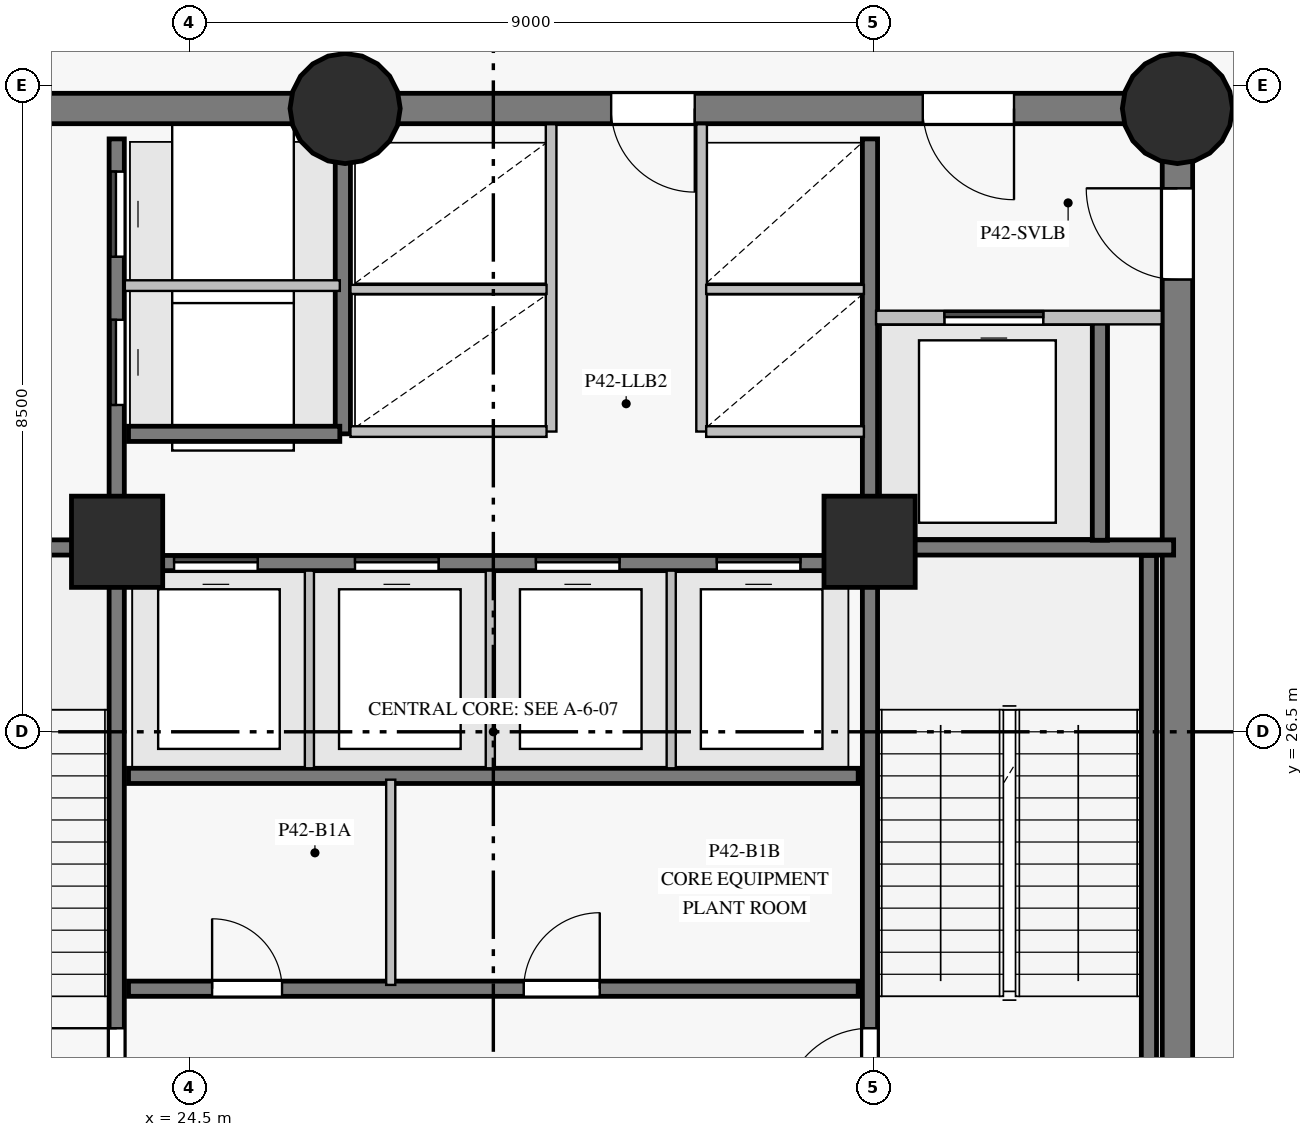
"""IFC4 building model, lengths in metres.
Left out: names, types, materials, properties, quantities, classifications, styles, units other than length and angle.
Written with IfcOpenShell. Run it as: python <this file> out.ifc"""

import sys

from ifc_helpers import new_model, si_unit, direction, frame, frame_2d, origin, origin_with_axes, origin_2d, place, context, subcontext, project, spatial, rectangle, circle, extrude, source, transform, mapped, element, fill, save


model = new_model("IFC4")
c1 = context("Model", 3, precision=1e-05, world=origin(), true_north=direction((0.0, 1.0)))
c2 = subcontext(c1, "Body", "Model", "MODEL_VIEW")
j1 = project(units=[si_unit("LENGTHUNIT", "METRE"), si_unit("PLANEANGLEUNIT", "RADIAN")], contexts=[c1])
p1 = place(None, origin())
s1 = spatial("IfcSite", under=j1, at=p1, CompositionType="ELEMENT")
p2 = place(p1, origin())
s2 = spatial("IfcBuilding", under=s1, at=p2, CompositionType="ELEMENT")
p3 = place(p2, frame((0.0, 0.0, 148.05)))
s3 = spatial("IfcBuildingStorey", under=s2, at=p3, CompositionType="ELEMENT", Elevation=148.05)
p4 = place(p3, frame((37.5, 18.3, 0.0), z_axis=(0.0, 0.0, 1.0), x_axis=(0.0, 1.0, 0.0)))
e1 = element("IfcWall", 1, at=p4, inside=s3, PredefinedType="SHEAR", context=c2, shape_type="SweptSolid", body=[
    extrude(rectangle(XDim=16.4, YDim=0.4, at=frame_2d((8.2, 0.0))), origin(), (0.0, 0.0, 1.0), 4.275),
])
p5 = place(p4, frame((14.15, 0.0, 0.0)))
e2 = element("IfcOpeningElement", 2, at=p5, cuts=e1, PredefinedType="OPENING", context=c2, shape_type="SweptSolid", body=[
    extrude(rectangle(XDim=1.2, YDim=2.15, at=frame_2d((0.6, 1.075))), frame((0.0, 0.21, 0.0), z_axis=(0.0, -1.0, 0.0), x_axis=(1.0, 0.0, 0.0)), (0.0, 0.0, 1.0), 0.42),
])
p6 = place(p3, frame((37.5, 34.7, 0.0), z_axis=(0.0, 0.0, 1.0), x_axis=(-1.0, 0.0, 0.0)))
e3 = element("IfcWall", 3, at=p6, inside=s3, PredefinedType="SHEAR", context=c2, shape_type="SweptSolid", body=[
    extrude(rectangle(XDim=10.95, YDim=0.4, at=frame_2d((5.475, 0.0))), origin(), (0.0, 0.0, 1.0), 4.275),
])
p7 = place(p6, frame((2.15, 0.0, 0.0)))
e4 = element("IfcOpeningElement", 4, at=p7, cuts=e3, PredefinedType="OPENING", context=c2, shape_type="SweptSolid", body=[
    extrude(rectangle(XDim=1.2, YDim=2.15, at=frame_2d((0.6, 1.075))), frame((0.0, 0.21, 0.0), z_axis=(0.0, -1.0, 0.0), x_axis=(1.0, 0.0, 0.0)), (0.0, 0.0, 1.0), 0.42),
])
p8 = place(p6, frame((6.35, 0.0, 0.0)))
e5 = element("IfcOpeningElement", 5, at=p8, cuts=e3, PredefinedType="OPENING", context=c2, shape_type="SweptSolid", body=[
    extrude(rectangle(XDim=1.1, YDim=2.15, at=frame_2d((0.55, 1.075))), frame((0.0, 0.21, 0.0), z_axis=(0.0, -1.0, 0.0), x_axis=(1.0, 0.0, 0.0)), (0.0, 0.0, 1.0), 0.42),
])
p9 = place(p3, frame((26.55, 34.7, 0.0), z_axis=(0.0, 0.0, 1.0), x_axis=(-1.0, 0.0, 0.0)))
e6 = element("IfcWall", 6, at=p9, inside=s3, PredefinedType="SHEAR", context=c2, shape_type="SweptSolid", body=[
    extrude(rectangle(XDim=7.05, YDim=0.4, at=frame_2d((3.525, 0.0))), origin(), (0.0, 0.0, 1.0), 4.275),
])
p10 = place(p9, frame((4.25, 0.0, 0.0)))
e7 = element("IfcOpeningElement", 7, at=p10, cuts=e6, PredefinedType="OPENING", context=c2, shape_type="SweptSolid", body=[
    extrude(rectangle(XDim=1.1, YDim=2.15, at=frame_2d((0.55, 1.075))), frame((0.0, 0.21, 0.0), z_axis=(0.0, -1.0, 0.0), x_axis=(1.0, 0.0, 0.0)), (0.0, 0.0, 1.0), 0.42),
])
m1 = source(origin_with_axes(), c2, "Body", "SweptSolid", [
    extrude(circle(Radius=0.725, at=origin_2d()), origin(), (0.0, 0.0, 1.0), 4.5),
])
for number, where, z_axis, x_axis in (
    (8, (26.55, 34.7, 0.0), (0.0, 0.0, 1.0), (1.0, 0.0, 0.0)),
    (9, (37.5, 34.7, 0.0), (0.0, 0.0, 1.0), (1.0, 0.0, 0.0)),
):
    element("IfcColumn", number, at=place(p3, frame(where, z_axis=z_axis, x_axis=x_axis)), inside=s3, PredefinedType="COLUMN", context=c2, shape_type="MappedRepresentation", body=[
        mapped(m1, transform((0.0, 0.0, 0.0), scale=1.0)),
    ])
m2 = source(origin_with_axes(), c2, "Body", "SweptSolid", [
    extrude(rectangle(XDim=1.2, YDim=1.2, at=origin_2d()), origin(), (0.0, 0.0, 1.0), 4.5),
])
for number, where, z_axis, x_axis in (
    (10, (23.55, 29.0, 0.0), (0.0, 0.0, 1.0), (1.0, 0.0, 0.0)),
    (11, (33.45, 29.0, 0.0), (0.0, 0.0, 1.0), (1.0, 0.0, 0.0)),
):
    element("IfcColumn", number, at=place(p3, frame(where, z_axis=z_axis, x_axis=x_axis)), inside=s3, PredefinedType="COLUMN", context=c2, shape_type="MappedRepresentation", body=[
        mapped(m2, transform((0.0, 0.0, 0.0), scale=1.0)),
    ])
p11 = place(p3, frame((23.545, 18.7, 0.0), z_axis=(0.0, 0.0, 1.0), x_axis=(0.0, 1.0, 0.0)))
e12 = element("IfcWall", 12, at=p11, inside=s3, PredefinedType="SHEAR", context=c2, shape_type="SweptSolid", body=[
    extrude(rectangle(XDim=15.6, YDim=0.2, at=frame_2d((7.8, 0.0))), origin(), (0.0, 0.0, 1.0), 4.275),
])
p12 = place(p11, frame((2.75, 0.0, 0.0)))
e13 = element("IfcOpeningElement", 13, at=p12, cuts=e12, PredefinedType="OPENING", context=c2, shape_type="SweptSolid", body=[
    extrude(rectangle(XDim=1.15, YDim=2.15, at=frame_2d((0.575, 1.075))), frame((0.0, 0.11, 0.0), z_axis=(0.0, -1.0, 0.0), x_axis=(1.0, 0.0, 0.0)), (0.0, 0.0, 1.0), 0.22),
])
p13 = place(p11, frame((0.14, 0.0, 0.0)))
e14 = element("IfcOpeningElement", 14, at=p13, cuts=e12, PredefinedType="OPENING", context=c2, shape_type="SweptSolid", body=[
    extrude(rectangle(XDim=0.88, YDim=2.1, at=frame_2d((0.44, 1.05))), frame((0.0, 0.11, 0.0), z_axis=(0.0, -1.0, 0.0), x_axis=(1.0, 0.0, 0.0)), (0.0, 0.0, 1.0), 0.22),
])
p14 = place(p11, frame((1.36, 0.0, 0.0)))
e15 = element("IfcOpeningElement", 15, at=p14, cuts=e12, PredefinedType="OPENING", context=c2, shape_type="SweptSolid", body=[
    extrude(rectangle(XDim=0.88, YDim=2.1, at=frame_2d((0.44, 1.05))), frame((0.0, 0.11, 0.0), z_axis=(0.0, -1.0, 0.0), x_axis=(1.0, 0.0, 0.0)), (0.0, 0.0, 1.0), 0.22),
])
p15 = place(p11, frame((12.1, 0.0, 0.0)))
e16 = element("IfcOpeningElement", 16, at=p15, cuts=e12, PredefinedType="OPENING", context=c2, shape_type="SweptSolid", body=[
    extrude(rectangle(XDim=1.12, YDim=2.15, at=frame_2d((0.56, 1.075))), frame((0.0, 0.11, 0.0), z_axis=(0.0, -1.0, 0.0), x_axis=(1.0, 0.0, 0.0)), (0.0, 0.0, 1.0), 0.22),
])
p16 = place(p11, frame((14.05, 0.0, 0.0)))
e17 = element("IfcOpeningElement", 17, at=p16, cuts=e12, PredefinedType="OPENING", context=c2, shape_type="SweptSolid", body=[
    extrude(rectangle(XDim=1.12, YDim=2.15, at=frame_2d((0.56, 1.075))), frame((0.0, 0.11, 0.0), z_axis=(0.0, -1.0, 0.0), x_axis=(1.0, 0.0, 0.0)), (0.0, 0.0, 1.0), 0.22),
])
p17 = place(p3, frame((33.455, 18.7, 0.0), z_axis=(0.0, 0.0, 1.0), x_axis=(0.0, 1.0, 0.0)))
e18 = element("IfcWall", 18, at=p17, inside=s3, PredefinedType="SHEAR", context=c2, shape_type="SweptSolid", body=[
    extrude(rectangle(XDim=15.6, YDim=0.2, at=frame_2d((7.8, 0.0))), origin(), (0.0, 0.0, 1.0), 4.275),
])
p18 = place(p17, frame((2.75, 0.0, 0.0)))
e19 = element("IfcOpeningElement", 19, at=p18, cuts=e18, PredefinedType="OPENING", context=c2, shape_type="SweptSolid", body=[
    extrude(rectangle(XDim=1.15, YDim=2.15, at=frame_2d((0.575, 1.075))), frame((0.0, 0.11, 0.0), z_axis=(0.0, -1.0, 0.0), x_axis=(1.0, 0.0, 0.0)), (0.0, 0.0, 1.0), 0.22),
])
p19 = place(p17, frame((0.55, 0.0, 0.0)))
e20 = element("IfcOpeningElement", 20, at=p19, cuts=e18, PredefinedType="OPENING", context=c2, shape_type="SweptSolid", body=[
    extrude(rectangle(XDim=0.94, YDim=2.1, at=frame_2d((0.47, 1.05))), frame((0.0, 0.11, 0.0), z_axis=(0.0, -1.0, 0.0), x_axis=(1.0, 0.0, 0.0)), (0.0, 0.0, 1.0), 0.22),
])
p20 = place(p3, frame((23.7, 23.12, 0.0), z_axis=(0.0, 0.0, 1.0), x_axis=(1.0, 0.0, 0.0)))
e21 = element("IfcWall", 21, at=p20, inside=s3, PredefinedType="SHEAR", context=c2, shape_type="SweptSolid", body=[
    extrude(rectangle(XDim=9.6, YDim=0.2, at=frame_2d((4.8, 0.0))), origin(), (0.0, 0.0, 1.0), 4.275),
])
p21 = place(p20, frame((1.1, 0.0, 0.0)))
e22 = element("IfcOpeningElement", 22, at=p21, cuts=e21, PredefinedType="OPENING", context=c2, shape_type="SweptSolid", body=[
    extrude(rectangle(XDim=0.92, YDim=2.1, at=frame_2d((0.46, 1.05))), frame((0.0, 0.11, 0.0), z_axis=(0.0, -1.0, 0.0), x_axis=(1.0, 0.0, 0.0)), (0.0, 0.0, 1.0), 0.22),
])
p22 = place(p20, frame((5.2, 0.0, 0.0)))
e23 = element("IfcOpeningElement", 23, at=p22, cuts=e21, PredefinedType="OPENING", context=c2, shape_type="SweptSolid", body=[
    extrude(rectangle(XDim=1.0, YDim=2.15, at=frame_2d((0.5, 1.075))), frame((0.0, 0.11, 0.0), z_axis=(0.0, -1.0, 0.0), x_axis=(1.0, 0.0, 0.0)), (0.0, 0.0, 1.0), 0.22),
])
p23 = place(p3, frame((23.7, 25.92, 0.0), z_axis=(0.0, 0.0, 1.0), x_axis=(1.0, 0.0, 0.0)))
e24 = element("IfcWall", 24, at=p23, inside=s3, PredefinedType="SHEAR", context=c2, shape_type="SweptSolid", body=[
    extrude(rectangle(XDim=9.6, YDim=0.2, at=frame_2d((4.8, 0.0))), origin(), (0.0, 0.0, 1.0), 4.275),
])
p24 = place(p3, frame((23.7, 28.72, 0.0), z_axis=(0.0, 0.0, 1.0), x_axis=(1.0, 0.0, 0.0)))
e25 = element("IfcWall", 25, at=p24, inside=s3, PredefinedType="SHEAR", context=c2, shape_type="SweptSolid", body=[
    extrude(rectangle(XDim=9.6, YDim=0.2, at=frame_2d((4.8, 0.0))), origin(), (0.0, 0.0, 1.0), 4.275),
])
p25 = place(p24, frame((0.6, 0.0, 0.0)))
e26 = element("IfcOpeningElement", 26, at=p25, cuts=e25, PredefinedType="OPENING", context=c2, shape_type="SweptSolid", body=[
    extrude(rectangle(XDim=1.1, YDim=2.15, at=frame_2d((0.55, 1.075))), frame((0.0, 0.11, 0.0), z_axis=(0.0, -1.0, 0.0), x_axis=(1.0, 0.0, 0.0)), (0.0, 0.0, 1.0), 0.22),
])
p26 = place(p24, frame((2.98, 0.0, 0.0)))
e27 = element("IfcOpeningElement", 27, at=p26, cuts=e25, PredefinedType="OPENING", context=c2, shape_type="SweptSolid", body=[
    extrude(rectangle(XDim=1.1, YDim=2.15, at=frame_2d((0.55, 1.075))), frame((0.0, 0.11, 0.0), z_axis=(0.0, -1.0, 0.0), x_axis=(1.0, 0.0, 0.0)), (0.0, 0.0, 1.0), 0.22),
])
p27 = place(p24, frame((5.36, 0.0, 0.0)))
e28 = element("IfcOpeningElement", 28, at=p27, cuts=e25, PredefinedType="OPENING", context=c2, shape_type="SweptSolid", body=[
    extrude(rectangle(XDim=1.1, YDim=2.15, at=frame_2d((0.55, 1.075))), frame((0.0, 0.11, 0.0), z_axis=(0.0, -1.0, 0.0), x_axis=(1.0, 0.0, 0.0)), (0.0, 0.0, 1.0), 0.22),
])
p28 = place(p24, frame((7.74, 0.0, 0.0)))
e29 = element("IfcOpeningElement", 29, at=p28, cuts=e25, PredefinedType="OPENING", context=c2, shape_type="SweptSolid", body=[
    extrude(rectangle(XDim=1.1, YDim=2.15, at=frame_2d((0.55, 1.075))), frame((0.0, 0.11, 0.0), z_axis=(0.0, -1.0, 0.0), x_axis=(1.0, 0.0, 0.0)), (0.0, 0.0, 1.0), 0.22),
])
p29 = place(p3, frame((37.125, 21.32, 0.0), z_axis=(0.0, 0.0, 1.0), x_axis=(0.0, 1.0, 0.0)))
e30 = element("IfcWall", 30, at=p29, inside=s3, PredefinedType="SHEAR", context=c2, shape_type="SweptSolid", body=[
    extrude(rectangle(XDim=7.5, YDim=0.2, at=frame_2d((3.75, 0.0))), origin(), (0.0, 0.0, 1.0), 4.275),
])
for number, where, z_axis, x_axis in (
    (31, (33.455, 28.925, 0.0), (0.0, 0.0, 1.0), (1.0, 0.0, 0.0)),
    (32, (19.55, 28.925, 0.0), (0.0, 0.0, 1.0), (1.0, 0.0, 0.0)),
):
    element("IfcWall", number, at=place(p3, frame(where, z_axis=z_axis, x_axis=x_axis)), inside=s3, PredefinedType="SHEAR", context=c2, shape_type="SweptSolid", body=[
        extrude(rectangle(XDim=3.995, YDim=0.2, at=frame_2d((1.998, 0.0))), origin(), (0.0, 0.0, 1.0), 4.275),
    ])
p30 = place(p3, frame((26.52, 30.42, 0.0), z_axis=(0.0, 0.0, 1.0), x_axis=(0.0, 1.0, 0.0)))
e33 = element("IfcWall", 33, at=p30, inside=s3, PredefinedType="SHEAR", context=c2, shape_type="SweptSolid", body=[
    extrude(rectangle(XDim=3.86, YDim=0.2, at=frame_2d((1.93, 0.0))), origin(), (0.0, 0.0, 1.0), 4.275),
])
p31 = place(p3, frame((36.48, 29.02, 0.0), z_axis=(0.0, 0.0, 1.0), x_axis=(0.0, 1.0, 0.0)))
e34 = element("IfcWall", 34, at=p31, inside=s3, PredefinedType="SHEAR", context=c2, shape_type="SweptSolid", body=[
    extrude(rectangle(XDim=2.86, YDim=0.2, at=frame_2d((1.43, 0.0))), origin(), (0.0, 0.0, 1.0), 4.275),
])
p32 = place(p3, frame((23.7, 30.42, 0.0), z_axis=(0.0, 0.0, 1.0), x_axis=(1.0, 0.0, 0.0)))
e35 = element("IfcWall", 35, at=p32, inside=s3, PredefinedType="SHEAR", context=c2, shape_type="SweptSolid", body=[
    extrude(rectangle(XDim=2.78, YDim=0.2, at=frame_2d((1.39, 0.0))), origin(), (0.0, 0.0, 1.0), 4.275),
])
for number, where, z_axis, x_axis in (
    (36, (29.26, 30.45, 0.0), (0.0, 0.0, 1.0), (0.0, 1.0, 0.0)),
    (37, (31.24, 30.45, 0.0), (0.0, 0.0, 1.0), (0.0, 1.0, 0.0)),
):
    element("IfcWall", number, at=place(p3, frame(where, z_axis=z_axis, x_axis=x_axis)), inside=s3, PredefinedType="PARTITIONING", context=c2, shape_type="SweptSolid", body=[
        extrude(rectangle(XDim=4.043, YDim=0.14, at=frame_2d((2.021, 0.0))), origin(), (0.0, 0.0, 1.0), 4.275),
    ])
p33 = place(p3, frame((33.535, 31.95, 0.0), z_axis=(0.0, 0.0, 1.0), x_axis=(1.0, 0.0, 0.0)))
e38 = element("IfcWall", 38, at=p33, inside=s3, PredefinedType="PARTITIONING", context=c2, shape_type="SweptSolid", body=[
    extrude(rectangle(XDim=3.759, YDim=0.18, at=frame_2d((1.879, 0.0))), origin(), (0.0, 0.0, 1.0), 4.275),
])
p34 = place(p33, frame((0.9, 0.0, 0.0)))
e39 = element("IfcOpeningElement", 39, at=p34, cuts=e38, PredefinedType="OPENING", context=c2, shape_type="SweptSolid", body=[
    extrude(rectangle(XDim=1.3, YDim=2.2, at=frame_2d((0.65, 1.1))), frame((0.0, 0.1, 0.0), z_axis=(0.0, -1.0, 0.0), x_axis=(1.0, 0.0, 0.0)), (0.0, 0.0, 1.0), 0.2),
])
p35 = place(p3, frame((23.652, 32.37, 0.0), z_axis=(0.0, 0.0, 1.0), x_axis=(1.0, 0.0, 0.0)))
e40 = element("IfcWall", 40, at=p35, inside=s3, PredefinedType="PARTITIONING", context=c2, shape_type="SweptSolid", body=[
    extrude(rectangle(XDim=2.828, YDim=0.14, at=frame_2d((1.414, 0.0))), origin(), (0.0, 0.0, 1.0), 4.275),
])
p36 = place(p3, frame((27.15, 23.17, 0.0), z_axis=(0.0, 0.0, 1.0), x_axis=(0.0, 1.0, 0.0)))
e41 = element("IfcWall", 41, at=p36, inside=s3, PredefinedType="PARTITIONING", context=c2, shape_type="SweptSolid", body=[
    extrude(rectangle(XDim=2.7, YDim=0.12, at=frame_2d((1.35, 0.0))), origin(), (0.0, 0.0, 1.0), 4.275),
])
for number, where, z_axis, x_axis in (
    (42, (26.08, 26.02, 0.0), (0.0, 0.0, 1.0), (0.0, 1.0, 0.0)),
    (43, (28.46, 26.02, 0.0), (0.0, 0.0, 1.0), (0.0, 1.0, 0.0)),
    (44, (30.84, 26.02, 0.0), (0.0, 0.0, 1.0), (0.0, 1.0, 0.0)),
):
    element("IfcWall", number, at=place(p3, frame(where, z_axis=z_axis, x_axis=x_axis)), inside=s3, PredefinedType="PARTITIONING", context=c2, shape_type="SweptSolid", body=[
        extrude(rectangle(XDim=2.6, YDim=0.12, at=frame_2d((1.3, 0.0))), origin(), (0.0, 0.0, 1.0), 4.275),
    ])
p37 = place(p3, frame((26.62, 30.45, 0.0), z_axis=(0.0, 0.0, 1.0), x_axis=(1.0, 0.0, 0.0)))
e45 = element("IfcWall", 45, at=p37, inside=s3, PredefinedType="PARTITIONING", context=c2, shape_type="SweptSolid", body=[
    extrude(rectangle(XDim=2.58, YDim=0.14, at=frame_2d((1.29, 0.0))), origin(), (0.0, 0.0, 1.0), 4.275),
])
p38 = place(p3, frame((26.62, 32.32, 0.0), z_axis=(0.0, 0.0, 1.0), x_axis=(1.0, 0.0, 0.0)))
e46 = element("IfcWall", 46, at=p38, inside=s3, PredefinedType="PARTITIONING", context=c2, shape_type="SweptSolid", body=[
    extrude(rectangle(XDim=2.58, YDim=0.12, at=frame_2d((1.29, 0.0))), origin(), (0.0, 0.0, 1.0), 4.275),
])
p39 = place(p3, frame((31.3, 30.45, 0.0), z_axis=(0.0, 0.0, 1.0), x_axis=(1.0, 0.0, 0.0)))
e47 = element("IfcWall", 47, at=p39, inside=s3, PredefinedType="PARTITIONING", context=c2, shape_type="SweptSolid", body=[
    extrude(rectangle(XDim=2.075, YDim=0.14, at=frame_2d((1.038, 0.0))), origin(), (0.0, 0.0, 1.0), 4.275),
])
p40 = place(p3, frame((31.3, 32.32, 0.0), z_axis=(0.0, 0.0, 1.0), x_axis=(1.0, 0.0, 0.0)))
e48 = element("IfcWall", 48, at=p40, inside=s3, PredefinedType="PARTITIONING", context=c2, shape_type="SweptSolid", body=[
    extrude(rectangle(XDim=2.075, YDim=0.12, at=frame_2d((1.038, 0.0))), origin(), (0.0, 0.0, 1.0), 4.275),
])
m3 = source(origin_with_axes(), c2, "Body", "SweptSolid", [
    extrude(rectangle(XDim=1.15, YDim=2.15, at=frame_2d((0.575, 1.075))), frame((0.0, 0.025, 0.0), z_axis=(0.0, -1.0, 0.0), x_axis=(1.0, 0.0, 0.0)), (0.0, 0.0, 1.0), 0.05),
])
p41 = place(p12, origin())
e49 = element("IfcDoor", 49, at=p41, inside=s3, OperationType="SINGLE_SWING_RIGHT", PredefinedType="DOOR", context=c2, shape_type="MappedRepresentation", body=[
    mapped(m3, transform((0.0, 0.0, 0.0), scale=1.0)),
])
fill(e13, e49)
p42 = place(p18, origin())
e50 = element("IfcDoor", 50, at=p42, inside=s3, OperationType="SINGLE_SWING_LEFT", PredefinedType="DOOR", context=c2, shape_type="MappedRepresentation", body=[
    mapped(m3, transform((0.0, 0.0, 0.0), scale=1.0)),
])
fill(e19, e50)
m4 = source(origin_with_axes(), c2, "Body", "SweptSolid", [
    extrude(rectangle(XDim=1.2, YDim=2.15, at=frame_2d((0.6, 1.075))), frame((0.0, 0.025, 0.0), z_axis=(0.0, -1.0, 0.0), x_axis=(1.0, 0.0, 0.0)), (0.0, 0.0, 1.0), 0.05),
])
p43 = place(p5, origin())
e51 = element("IfcDoor", 51, at=p43, inside=s3, OperationType="SINGLE_SWING_RIGHT", PredefinedType="DOOR", context=c2, shape_type="MappedRepresentation", body=[
    mapped(m4, transform((0.0, 0.0, 0.0), scale=1.0)),
])
fill(e2, e51)
p44 = place(p7, origin())
e52 = element("IfcDoor", 52, at=p44, inside=s3, OperationType="SINGLE_SWING_LEFT", PredefinedType="DOOR", context=c2, shape_type="MappedRepresentation", body=[
    mapped(m4, transform((0.0, 0.0, 0.0), scale=1.0)),
])
fill(e4, e52)
m5 = source(origin_with_axes(), c2, "Body", "SweptSolid", [
    extrude(rectangle(XDim=1.3, YDim=2.2, at=frame_2d((0.65, 1.1))), frame((0.0, 0.025, 0.0), z_axis=(0.0, -1.0, 0.0), x_axis=(1.0, 0.0, 0.0)), (0.0, 0.0, 1.0), 0.05),
])
p45 = place(p34, origin())
e53 = element("IfcDoor", 53, at=p45, inside=s3, OperationType="SLIDING_TO_LEFT", PredefinedType="DOOR", context=c2, shape_type="MappedRepresentation", body=[
    mapped(m5, transform((0.0, 0.0, 0.0), scale=1.0)),
])
fill(e39, e53)
m6 = source(origin_with_axes(), c2, "Body", "SweptSolid", [
    extrude(rectangle(XDim=0.92, YDim=2.1, at=frame_2d((0.46, 1.05))), frame((0.0, 0.025, 0.0), z_axis=(0.0, -1.0, 0.0), x_axis=(1.0, 0.0, 0.0)), (0.0, 0.0, 1.0), 0.05),
])
p46 = place(p21, origin())
e54 = element("IfcDoor", 54, at=p46, inside=s3, OperationType="SINGLE_SWING_LEFT", PredefinedType="DOOR", context=c2, shape_type="MappedRepresentation", body=[
    mapped(m6, transform((0.0, 0.0, 0.0), scale=1.0)),
])
fill(e22, e54)
m7 = source(origin_with_axes(), c2, "Body", "SweptSolid", [
    extrude(rectangle(XDim=1.0, YDim=2.15, at=frame_2d((0.5, 1.075))), frame((0.0, 0.025, 0.0), z_axis=(0.0, -1.0, 0.0), x_axis=(1.0, 0.0, 0.0)), (0.0, 0.0, 1.0), 0.05),
])
p47 = place(p22, origin())
e55 = element("IfcDoor", 55, at=p47, inside=s3, OperationType="SINGLE_SWING_RIGHT", PredefinedType="DOOR", context=c2, shape_type="MappedRepresentation", body=[
    mapped(m7, transform((0.0, 0.0, 0.0), scale=1.0)),
])
fill(e23, e55)
m8 = source(origin_with_axes(), c2, "Body", "SweptSolid", [
    extrude(rectangle(XDim=1.1, YDim=2.15, at=frame_2d((0.55, 1.075))), frame((0.0, 0.025, 0.0), z_axis=(0.0, -1.0, 0.0), x_axis=(1.0, 0.0, 0.0)), (0.0, 0.0, 1.0), 0.05),
])
p48 = place(p25, origin())
e56 = element("IfcDoor", 56, at=p48, inside=s3, OperationType="SLIDING_TO_LEFT", PredefinedType="DOOR", context=c2, shape_type="MappedRepresentation", body=[
    mapped(m8, transform((0.0, 0.0, 0.0), scale=1.0)),
])
fill(e26, e56)
p49 = place(p26, origin())
e57 = element("IfcDoor", 57, at=p49, inside=s3, OperationType="SLIDING_TO_RIGHT", PredefinedType="DOOR", context=c2, shape_type="MappedRepresentation", body=[
    mapped(m8, transform((0.0, 0.0, 0.0), scale=1.0)),
])
fill(e27, e57)
p50 = place(p27, origin())
e58 = element("IfcDoor", 58, at=p50, inside=s3, OperationType="SLIDING_TO_LEFT", PredefinedType="DOOR", context=c2, shape_type="MappedRepresentation", body=[
    mapped(m8, transform((0.0, 0.0, 0.0), scale=1.0)),
])
fill(e28, e58)
p51 = place(p28, origin())
e59 = element("IfcDoor", 59, at=p51, inside=s3, OperationType="SLIDING_TO_RIGHT", PredefinedType="DOOR", context=c2, shape_type="MappedRepresentation", body=[
    mapped(m8, transform((0.0, 0.0, 0.0), scale=1.0)),
])
fill(e29, e59)
p52 = place(p8, origin())
e60 = element("IfcDoor", 60, at=p52, inside=s3, OperationType="SINGLE_SWING_LEFT", PredefinedType="DOOR", context=c2, shape_type="MappedRepresentation", body=[
    mapped(m8, transform((0.0, 0.0, 0.0), scale=1.0)),
])
fill(e5, e60)
m9 = source(origin_with_axes(), c2, "Body", "SweptSolid", [
    extrude(rectangle(XDim=1.12, YDim=2.15, at=frame_2d((0.56, 1.075))), frame((0.0, 0.025, 0.0), z_axis=(0.0, -1.0, 0.0), x_axis=(1.0, 0.0, 0.0)), (0.0, 0.0, 1.0), 0.05),
])
p53 = place(p15, origin())
e61 = element("IfcDoor", 61, at=p53, inside=s3, OperationType="SLIDING_TO_LEFT", PredefinedType="DOOR", context=c2, shape_type="MappedRepresentation", body=[
    mapped(m9, transform((0.0, 0.0, 0.0), scale=1.0)),
])
fill(e16, e61)
p54 = place(p16, origin())
e62 = element("IfcDoor", 62, at=p54, inside=s3, OperationType="SLIDING_TO_RIGHT", PredefinedType="DOOR", context=c2, shape_type="MappedRepresentation", body=[
    mapped(m9, transform((0.0, 0.0, 0.0), scale=1.0)),
])
fill(e17, e62)
save(model, sys.argv[1])
